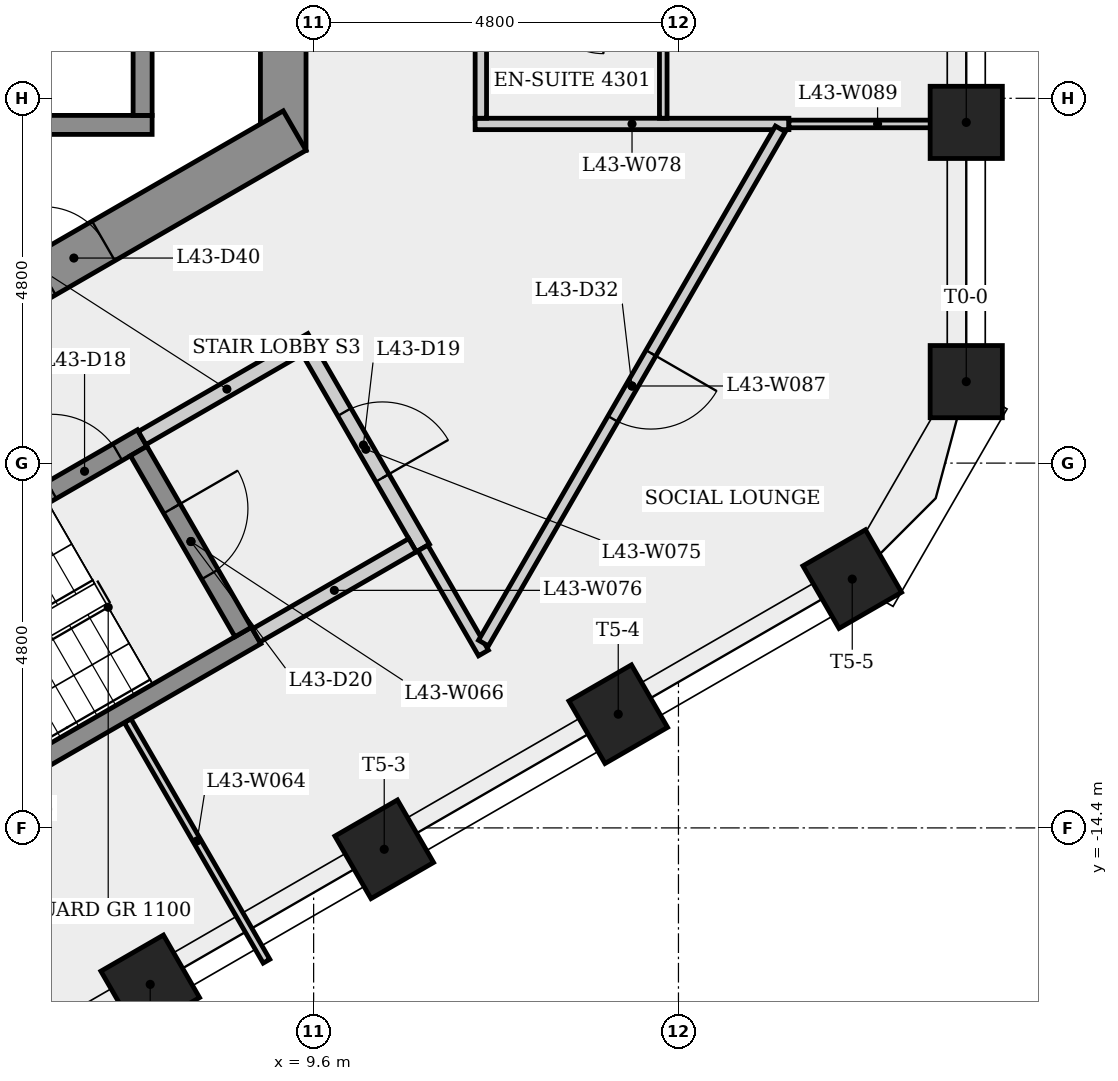
"""IFC4 building model, lengths in metres.
Left out: names, types, materials, properties, quantities, classifications, styles, units other than length and angle.
Written with IfcOpenShell. Run it as: python <this file> out.ifc"""

import sys

from ifc_helpers import new_model, si_unit, direction, frame, frame_2d, origin, origin_2d, place, context, subcontext, project, spatial, rectangle, extrude, element, fill, save


model = new_model("IFC4")
c1 = context("Model", 3, precision=1e-05, world=origin(), true_north=direction((0.0, 1.0)))
c2 = subcontext(c1, "Body", "Model", "MODEL_VIEW")
j1 = project(units=[si_unit("LENGTHUNIT", "METRE"), si_unit("PLANEANGLEUNIT", "RADIAN")], contexts=[c1])
p1 = place(None, origin())
s1 = spatial("IfcSite", under=j1, at=p1, CompositionType="ELEMENT")
p2 = place(p1, origin())
s2 = spatial("IfcBuilding", under=s1, at=p2, CompositionType="ELEMENT")
p3 = place(p2, frame((0.0, 0.0, 162.9)))
s3 = spatial("IfcBuildingStorey", under=s2, at=p3, CompositionType="ELEMENT", Elevation=162.9)
p4 = place(p3, frame((9.2, -5.485, 0.0), z_axis=(0.0, 0.0, 1.0), x_axis=(0.0, 1.0, 0.0)))
e1 = element("IfcWall", 1, at=p4, inside=s3, PredefinedType="SHEAR", context=c2, shape_type="SweptSolid", body=[
    extrude(rectangle(XDim=10.97, YDim=0.6, at=frame_2d((5.485, 0.0))), origin(), (0.0, 0.0, 1.0), 3.4),
])
p5 = place(p4, frame((4.685, 0.0, 0.0)))
e2 = element("IfcOpeningElement", 2, at=p5, cuts=e1, PredefinedType="OPENING", context=c2, shape_type="SweptSolid", body=[
    extrude(rectangle(XDim=1.6, YDim=2.1, at=frame_2d((0.8, 1.05))), frame((0.0, 0.31, 0.0), z_axis=(0.0, -1.0, 0.0), x_axis=(1.0, 0.0, 0.0)), (0.0, 0.0, 1.0), 0.62),
])
p6 = place(p3, frame((-0.15, -10.71, 0.0), z_axis=(0.0, 0.0, 1.0), x_axis=(0.866023993627, 0.500002442456, 0.0)))
e3 = element("IfcWall", 3, at=p6, inside=s3, PredefinedType="SHEAR", context=c2, shape_type="SweptSolid", body=[
    extrude(rectangle(XDim=10.97, YDim=0.6, at=frame_2d((5.485, 0.0))), origin(), (0.0, 0.0, 1.0), 3.4),
])
p7 = place(p6, frame((7.166, 0.0, 0.0)))
e4 = element("IfcOpeningElement", 4, at=p7, cuts=e3, PredefinedType="OPENING", context=c2, shape_type="SweptSolid", body=[
    extrude(rectangle(XDim=0.9, YDim=2.1, at=frame_2d((0.45, 1.05))), frame((0.0, 0.31, 0.0), z_axis=(0.0, -1.0, 0.0), x_axis=(1.0, 0.0, 0.0)), (0.0, 0.0, 1.0), 0.62),
])
for number, where, z_axis, x_axis in (
    (5, (18.187, -8.528, 0.0), (0.0, 0.0, 1.0), (1.0, 0.0, 0.0)),
    (6, (18.187, -5.117, 0.0), (0.0, 0.0, 1.0), (1.0, 0.0, 0.0)),
    (7, (7.45, -16.459, 0.0), (0.0, 0.0, 1.0), (0.5, -0.866, 0.0)),
    (8, (10.529, -14.681, 0.0), (0.0, 0.0, 1.0), (0.5, -0.866, 0.0)),
    (9, (13.608, -12.904, 0.0), (0.0, 0.0, 1.0), (0.5, -0.866, 0.0)),
    (10, (16.687, -11.126, 0.0), (0.0, 0.0, 1.0), (0.5, -0.866, 0.0)),
):
    element("IfcColumn", number, at=place(p3, frame(where, z_axis=z_axis, x_axis=x_axis)), inside=s3, PredefinedType="COLUMN", context=c2, shape_type="SweptSolid", body=[
        extrude(rectangle(XDim=0.95, YDim=0.95, at=origin_2d()), origin(), (0.0, 0.0, 1.0), 3.4),
    ])
p8 = place(p3, frame((1.585, -12.595, 0.0), z_axis=(0.0, 0.0, 1.0), x_axis=(0.866036417653, 0.499980922934, 0.0)))
e11 = element("IfcWall", 11, at=p8, inside=s3, PredefinedType="SHEAR", context=c2, shape_type="SweptSolid", body=[
    extrude(rectangle(XDim=6.65, YDim=0.25, at=frame_2d((3.325, 0.0))), origin(), (0.0, 0.0, 1.0), 3.05),
])
p9 = place(p8, frame((5.275, 0.0, 0.0)))
e12 = element("IfcOpeningElement", 12, at=p9, cuts=e11, PredefinedType="OPENING", context=c2, shape_type="SweptSolid", body=[
    extrude(rectangle(XDim=1.0, YDim=2.1, at=frame_2d((0.5, 1.05))), frame((0.0, 0.135, 0.0), z_axis=(0.0, -1.0, 0.0), x_axis=(1.0, 0.0, 0.0)), (0.0, 0.0, 1.0), 0.27),
])
p10 = place(p3, frame((2.575, -5.15, 0.0), z_axis=(0.0, 0.0, 1.0), x_axis=(1.0, 0.0, 0.0)))
e13 = element("IfcWall", 13, at=p10, inside=s3, PredefinedType="SHEAR", context=c2, shape_type="SweptSolid", body=[
    extrude(rectangle(XDim=4.9, YDim=0.25, at=frame_2d((2.45, 0.0))), origin(), (0.0, 0.0, 1.0), 3.05),
])
p11 = place(p3, frame((7.153, -12.989, 0.0), z_axis=(0.0, 0.0, 1.0), x_axis=(0.500011578892, -0.866018718605, 0.0)))
e14 = element("IfcWall", 14, at=p11, inside=s3, PredefinedType="PARTITIONING", context=c2, shape_type="SweptSolid", body=[
    extrude(rectangle(XDim=3.655, YDim=0.1, at=frame_2d((1.827, 0.0))), origin(), (0.0, 0.0, 1.0), 3.05),
])
p12 = place(p3, frame((3.301, -15.068, 0.0), z_axis=(0.0, 0.0, 1.0), x_axis=(0.866035036182, 0.499983315828, 0.0)))
e15 = element("IfcWall", 15, at=p12, inside=s3, PredefinedType="SHEAR", context=c2, shape_type="SweptSolid", body=[
    extrude(rectangle(XDim=6.4, YDim=0.25, at=frame_2d((3.2, 0.0))), origin(), (0.0, 0.0, 1.0), 3.05),
])
p13 = place(p3, frame((7.298, -9.441, 0.0), z_axis=(0.0, 0.0, 1.0), x_axis=(0.500034990121, -0.866005201286, 0.0)))
e16 = element("IfcWall", 16, at=p13, inside=s3, PredefinedType="SHEAR", context=c2, shape_type="SweptSolid", body=[
    extrude(rectangle(XDim=2.75, YDim=0.25, at=frame_2d((1.375, 0.0))), origin(), (0.0, 0.0, 1.0), 3.05),
])
p14 = place(p13, frame((0.875, 0.0, 0.0)))
e17 = element("IfcOpeningElement", 17, at=p14, cuts=e16, PredefinedType="OPENING", context=c2, shape_type="SweptSolid", body=[
    extrude(rectangle(XDim=1.0, YDim=2.1, at=frame_2d((0.5, 1.05))), frame((0.0, 0.135, 0.0), z_axis=(0.0, -1.0, 0.0), x_axis=(1.0, 0.0, 0.0)), (0.0, 0.0, 1.0), 0.27),
])
p15 = place(p3, frame((7.344, -9.27, 0.0), z_axis=(0.0, 0.0, 1.0), x_axis=(0.866005588531, 0.500034319456, 0.0)))
e18 = element("IfcWall", 18, at=p15, inside=s3, PredefinedType="PARTITIONING", context=c2, shape_type="SweptSolid", body=[
    extrude(rectangle(XDim=2.575, YDim=0.2, at=frame_2d((1.288, 0.0))), origin(), (0.0, 0.0, 1.0), 3.05),
])
p16 = place(p3, frame((7.35, -1.925, 0.0), z_axis=(0.0, 0.0, 1.0), x_axis=(0.0, -1.0, 0.0)))
e19 = element("IfcWall", 19, at=p16, inside=s3, PredefinedType="SHEAR", context=c2, shape_type="SweptSolid", body=[
    extrude(rectangle(XDim=3.1, YDim=0.25, at=frame_2d((1.55, 0.0))), origin(), (0.0, 0.0, 1.0), 3.4),
])
p17 = place(p3, frame((9.537, -8.119, 0.0), z_axis=(0.0, 0.0, 1.0), x_axis=(0.499990139034, -0.866031096941, 0.0)))
e20 = element("IfcWall", 20, at=p17, inside=s3, PredefinedType="PARTITIONING", context=c2, shape_type="SweptSolid", body=[
    extrude(rectangle(XDim=3.0, YDim=0.2, at=frame_2d((1.5, 0.0))), origin(), (0.0, 0.0, 1.0), 3.05),
])
p18 = place(p17, frame((0.935, 0.0, 0.0)))
e21 = element("IfcOpeningElement", 21, at=p18, cuts=e20, PredefinedType="OPENING", context=c2, shape_type="SweptSolid", body=[
    extrude(rectangle(XDim=1.0, YDim=2.1, at=frame_2d((0.5, 1.05))), frame((0.0, 0.11, 0.0), z_axis=(0.0, -1.0, 0.0), x_axis=(1.0, 0.0, 0.0)), (0.0, 0.0, 1.0), 0.22),
])
p19 = place(p3, frame((10.901, -10.681, 0.0), z_axis=(0.0, 0.0, 1.0), x_axis=(-0.866007538022, -0.500030943131, 0.0)))
e22 = element("IfcWall", 22, at=p19, inside=s3, PredefinedType="PARTITIONING", context=c2, shape_type="SweptSolid", body=[
    extrude(rectangle(XDim=2.375, YDim=0.2, at=frame_2d((1.188, 0.0))), origin(), (0.0, 0.0, 1.0), 3.05),
])
p20 = place(p3, frame((11.835, -12.098, 0.0), z_axis=(0.0, 0.0, 1.0), x_axis=(-0.499991908467, 0.866030075383, 0.0)))
e23 = element("IfcWall", 23, at=p20, inside=s3, PredefinedType="PARTITIONING", context=c2, shape_type="SweptSolid", body=[
    extrude(rectangle(XDim=1.595, YDim=0.15, at=frame_2d((0.797, 0.0))), origin(), (0.0, 0.0, 1.0), 3.05),
])
p21 = place(p3, frame((11.725, -5.137, 0.0), z_axis=(0.0, 0.0, 1.0), x_axis=(1.0, 0.0, 0.0)))
e24 = element("IfcWall", 24, at=p21, inside=s3, PredefinedType="PARTITIONING", context=c2, shape_type="SweptSolid", body=[
    extrude(rectangle(XDim=4.128, YDim=0.15, at=frame_2d((2.064, 0.0))), origin(), (0.0, 0.0, 1.0), 3.05),
])
p22 = place(p3, frame((11.8, -5.062, 0.0), z_axis=(0.0, 0.0, 1.0), x_axis=(0.0, 1.0, 0.0)))
e25 = element("IfcWall", 25, at=p22, inside=s3, PredefinedType="PARTITIONING", context=c2, shape_type="SweptSolid", body=[
    extrude(rectangle(XDim=10.275, YDim=0.15, at=frame_2d((5.137, 0.0))), origin(), (0.0, 0.0, 1.0), 3.05),
])
p23 = place(p22, frame((2.05, 0.0, 0.0)))
e26 = element("IfcOpeningElement", 26, at=p23, cuts=e25, PredefinedType="OPENING", context=c2, shape_type="SweptSolid", body=[
    extrude(rectangle(XDim=0.9, YDim=2.1, at=frame_2d((0.45, 1.05))), frame((0.0, 0.085, 0.0), z_axis=(0.0, -1.0, 0.0), x_axis=(1.0, 0.0, 0.0)), (0.0, 0.0, 1.0), 0.17),
])
p24 = place(p22, frame((6.275, 0.0, 0.0)))
e27 = element("IfcOpeningElement", 27, at=p24, cuts=e25, PredefinedType="OPENING", context=c2, shape_type="SweptSolid", body=[
    extrude(rectangle(XDim=1.0, YDim=2.1, at=frame_2d((0.5, 1.05))), frame((0.0, 0.085, 0.0), z_axis=(0.0, -1.0, 0.0), x_axis=(1.0, 0.0, 0.0)), (0.0, 0.0, 1.0), 0.17),
])
p25 = place(p3, frame((14.2, -5.062, 0.0), z_axis=(0.0, 0.0, 1.0), x_axis=(0.0, 1.0, 0.0)))
e28 = element("IfcWall", 28, at=p25, inside=s3, PredefinedType="PARTITIONING", context=c2, shape_type="SweptSolid", body=[
    extrude(rectangle(XDim=1.7, YDim=0.1, at=frame_2d((0.85, 0.0))), origin(), (0.0, 0.0, 1.0), 3.05),
])
p26 = place(p3, frame((15.741, -5.202, 0.0), z_axis=(0.0, 0.0, 1.0), x_axis=(-0.499974030515, -0.866040396754, 0.0)))
e29 = element("IfcWall", 29, at=p26, inside=s3, PredefinedType="PARTITIONING", context=c2, shape_type="SweptSolid", body=[
    extrude(rectangle(XDim=7.812, YDim=0.15, at=frame_2d((3.906, 0.0))), origin(), (0.0, 0.0, 1.0), 3.05),
])
p27 = place(p26, frame((3.406, 0.0, 0.0)))
e30 = element("IfcOpeningElement", 30, at=p27, cuts=e29, PredefinedType="OPENING", context=c2, shape_type="SweptSolid", body=[
    extrude(rectangle(XDim=1.0, YDim=2.1, at=frame_2d((0.5, 1.05))), frame((0.0, 0.085, 0.0), z_axis=(0.0, -1.0, 0.0), x_axis=(1.0, 0.0, 0.0)), (0.0, 0.0, 1.0), 0.17),
])
p28 = place(p3, frame((18.187, -5.137, 0.0), z_axis=(0.0, 0.0, 1.0), x_axis=(-1.0, 0.0, 0.0)))
e31 = element("IfcWall", 31, at=p28, inside=s3, PredefinedType="PARTITIONING", context=c2, shape_type="SweptSolid", body=[
    extrude(rectangle(XDim=2.333, YDim=0.1, at=frame_2d((1.167, 0.0))), origin(), (0.0, 0.0, 1.0), 3.05),
])
p29 = place(p9, origin())
e32 = element("IfcDoor", 32, at=p29, inside=s3, OperationType="SINGLE_SWING_LEFT", PredefinedType="DOOR", context=c2, shape_type="SweptSolid", body=[
    extrude(rectangle(XDim=1.0, YDim=2.1, at=frame_2d((0.5, 1.05))), frame((0.0, 0.025, 0.0), z_axis=(0.0, -1.0, 0.0), x_axis=(1.0, 0.0, 0.0)), (0.0, 0.0, 1.0), 0.05),
])
fill(e12, e32)
p30 = place(p18, origin())
e33 = element("IfcDoor", 33, at=p30, inside=s3, OperationType="SINGLE_SWING_RIGHT", PredefinedType="DOOR", context=c2, shape_type="SweptSolid", body=[
    extrude(rectangle(XDim=1.0, YDim=2.1, at=frame_2d((0.5, 1.05))), frame((0.0, 0.025, 0.0), z_axis=(0.0, -1.0, 0.0), x_axis=(1.0, 0.0, 0.0)), (0.0, 0.0, 1.0), 0.05),
])
fill(e21, e33)
p31 = place(p14, origin())
e34 = element("IfcDoor", 34, at=p31, inside=s3, OperationType="SINGLE_SWING_LEFT", PredefinedType="DOOR", context=c2, shape_type="SweptSolid", body=[
    extrude(rectangle(XDim=1.0, YDim=2.1, at=frame_2d((0.5, 1.05))), frame((0.0, 0.025, 0.0), z_axis=(0.0, -1.0, 0.0), x_axis=(1.0, 0.0, 0.0)), (0.0, 0.0, 1.0), 0.05),
])
fill(e17, e34)
p32 = place(p27, origin())
e35 = element("IfcDoor", 35, at=p32, inside=s3, OperationType="SINGLE_SWING_LEFT", PredefinedType="DOOR", context=c2, shape_type="SweptSolid", body=[
    extrude(rectangle(XDim=1.0, YDim=2.1, at=frame_2d((0.5, 1.05))), frame((0.0, 0.025, 0.0), z_axis=(0.0, -1.0, 0.0), x_axis=(1.0, 0.0, 0.0)), (0.0, 0.0, 1.0), 0.05),
])
fill(e30, e35)
p33 = place(p7, origin())
e36 = element("IfcDoor", 36, at=p33, inside=s3, OperationType="SINGLE_SWING_LEFT", PredefinedType="DOOR", context=c2, shape_type="SweptSolid", body=[
    extrude(rectangle(XDim=0.9, YDim=2.1, at=frame_2d((0.45, 1.05))), frame((0.0, 0.025, 0.0), z_axis=(0.0, -1.0, 0.0), x_axis=(1.0, 0.0, 0.0)), (0.0, 0.0, 1.0), 0.05),
])
fill(e4, e36)
save(model, sys.argv[1])
